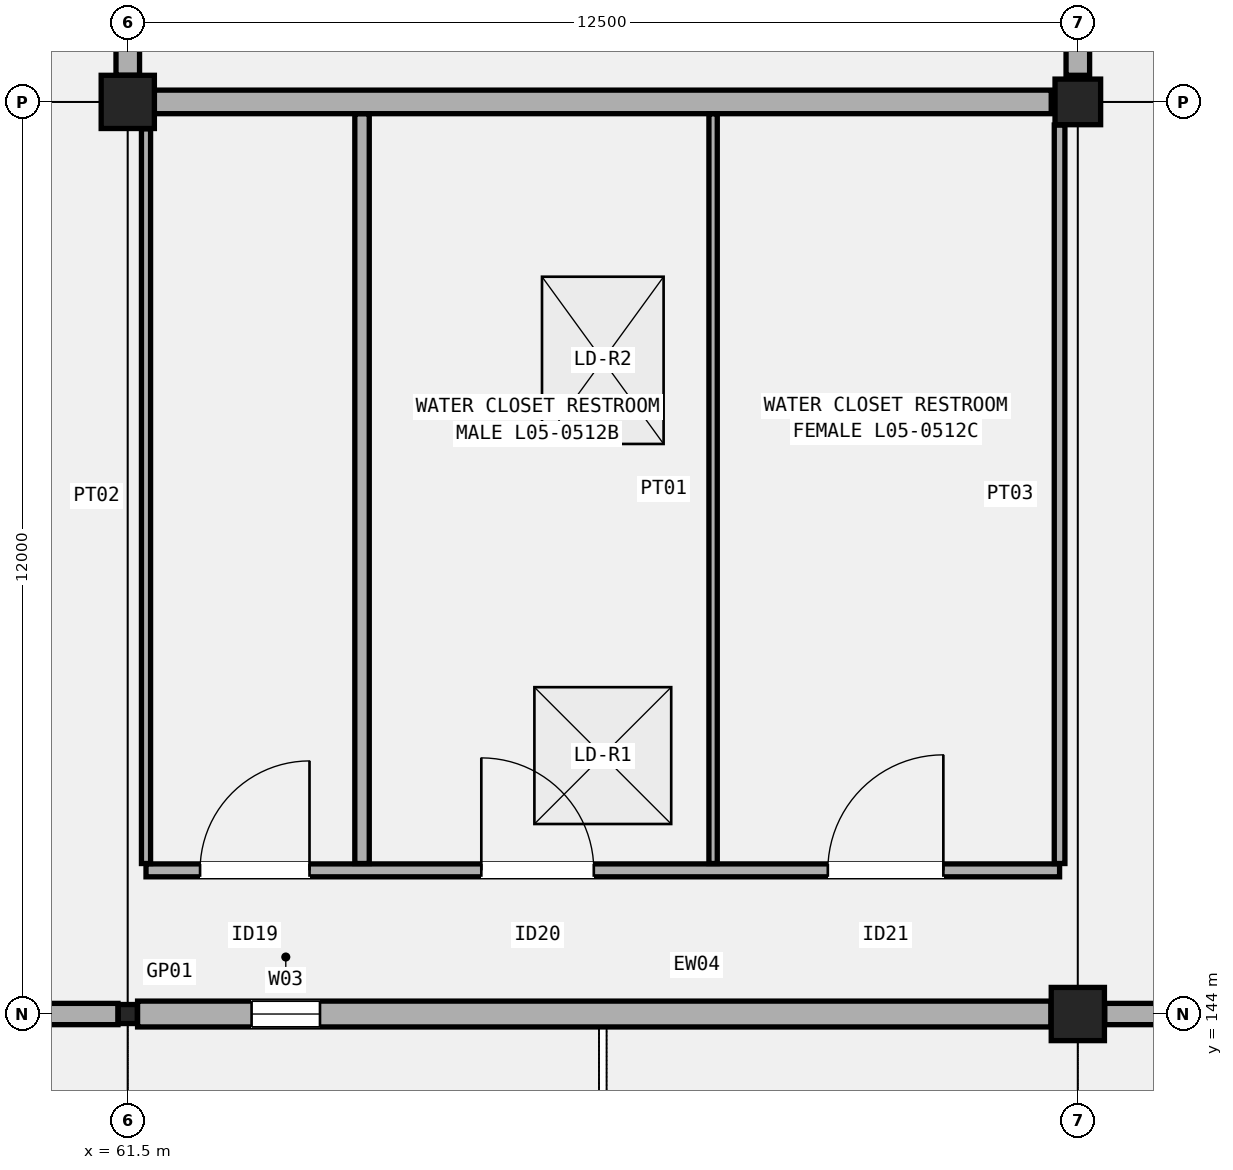
"""IFC4 building model, lengths in metres.
Left out: names, types, materials, properties, quantities, classifications, styles, units other than length and angle.
Written with IfcOpenShell. Run it as: python <this file> out.ifc"""

import sys

from ifc_helpers import new_model, si_unit, direction, frame, frame_2d, origin, origin_2d, place, context, subcontext, project, spatial, rectangle, hollow_rectangle, extrude, element, fill, save


model = new_model("IFC4")
c1 = context("Model", 3, precision=1e-05, world=origin(), true_north=direction((0.0, 1.0)))
c2 = subcontext(c1, "Body", "Model", "MODEL_VIEW")
j1 = project(units=[si_unit("LENGTHUNIT", "METRE"), si_unit("PLANEANGLEUNIT", "RADIAN")], contexts=[c1])
p1 = place(None, origin())
s1 = spatial("IfcSite", under=j1, at=p1, CompositionType="ELEMENT")
p2 = place(p1, origin())
s2 = spatial("IfcBuilding", under=s1, at=p2, CompositionType="ELEMENT")
p3 = place(p2, frame((0.0, 0.0, 25.8)))
s3 = spatial("IfcBuildingStorey", under=s2, at=p3, CompositionType="ELEMENT", Elevation=25.8)
p4 = place(p3, frame((61.5, 144.0, 0.0), z_axis=(0.0, 0.0, 1.0), x_axis=(1.0, 0.0, 0.0)))
e1 = element("IfcColumn", 1, at=p4, inside=s3, PredefinedType="COLUMN", context=c2, shape_type="SweptSolid", body=[
    extrude(hollow_rectangle(XDim=0.25, YDim=0.25, WallThickness=0.012, InnerFilletRadius=0.012, OuterFilletRadius=0.024, at=origin_2d()), origin(), (0.0, 0.0, 1.0), 5.4),
])
for number, where, z_axis, x_axis in (
    (2, (61.5, 156.0, 0.0), (0.0, 0.0, 1.0), (1.0, 0.0, 0.0)),
    (3, (74.0, 144.0, 0.0), (0.0, 0.0, 1.0), (1.0, 0.0, 0.0)),
):
    element("IfcColumn", number, at=place(p3, frame(where, z_axis=z_axis, x_axis=x_axis)), inside=s3, PredefinedType="COLUMN", context=c2, shape_type="SweptSolid", body=[
        extrude(rectangle(XDim=0.7, YDim=0.7, at=origin_2d()), origin(), (0.0, 0.0, 1.0), 5.4),
    ])
p5 = place(p3, frame((74.0, 156.0, 0.0), z_axis=(0.0, 0.0, 1.0), x_axis=(1.0, 0.0, 0.0)))
e4 = element("IfcColumn", 4, at=p5, inside=s3, PredefinedType="COLUMN", context=c2, shape_type="SweptSolid", body=[
    extrude(rectangle(XDim=0.6, YDim=0.6, at=origin_2d()), origin(), (0.0, 0.0, 1.0), 5.4),
])
p6 = place(p3, frame((49.154, 144.0, 0.0), z_axis=(0.0, 0.0, 1.0), x_axis=(1.0, 0.0, 0.0)))
e5 = element("IfcWall", 5, at=p6, inside=s3, PredefinedType="SOLIDWALL", context=c2, shape_type="SweptSolid", body=[
    extrude(rectangle(XDim=12.217, YDim=0.28, at=frame_2d((6.108, 0.0))), origin(), (0.0, 0.0, 1.0), 4.13),
])
p7 = place(p6, frame((1.5, 0.0, 0.95)))
e6 = element("IfcOpeningElement", 6, at=p7, cuts=e5, PredefinedType="OPENING", context=c2, shape_type="SweptSolid", body=[
    extrude(rectangle(XDim=3.6, YDim=1.75, at=frame_2d((1.8, 0.875))), frame((0.0, 0.15, 0.0), z_axis=(0.0, -1.0, 0.0), x_axis=(1.0, 0.0, 0.0)), (0.0, 0.0, 1.0), 0.3),
])
p8 = place(p3, frame((61.629, 144.0, 0.0), z_axis=(0.0, 0.0, 1.0), x_axis=(1.0, 0.0, 0.0)))
e7 = element("IfcWall", 7, at=p8, inside=s3, PredefinedType="SOLIDWALL", context=c2, shape_type="SweptSolid", body=[
    extrude(rectangle(XDim=12.017, YDim=0.34, at=frame_2d((6.009, 0.0))), origin(), (0.0, 0.0, 1.0), 4.13),
])
p9 = place(p8, frame((1.5, 0.0, 0.95)))
e8 = element("IfcOpeningElement", 8, at=p9, cuts=e7, PredefinedType="OPENING", context=c2, shape_type="SweptSolid", body=[
    extrude(rectangle(XDim=0.9, YDim=2.7, at=frame_2d((0.45, 1.35))), frame((0.0, 0.18, 0.0), z_axis=(0.0, -1.0, 0.0), x_axis=(1.0, 0.0, 0.0)), (0.0, 0.0, 1.0), 0.36),
])
p10 = place(p3, frame((74.354, 144.0, 0.0), z_axis=(0.0, 0.0, 1.0), x_axis=(1.0, 0.0, 0.0)))
e9 = element("IfcWall", 9, at=p10, inside=s3, PredefinedType="SOLIDWALL", context=c2, shape_type="SweptSolid", body=[
    extrude(rectangle(XDim=11.842, YDim=0.28, at=frame_2d((5.921, 0.0))), origin(), (0.0, 0.0, 1.0), 4.13),
])
p11 = place(p10, frame((1.5, 0.0, 0.95)))
e10 = element("IfcOpeningElement", 10, at=p11, cuts=e9, PredefinedType="OPENING", context=c2, shape_type="SweptSolid", body=[
    extrude(rectangle(XDim=1.2, YDim=1.9, at=frame_2d((0.6, 0.95))), frame((0.0, 0.15, 0.0), z_axis=(0.0, -1.0, 0.0), x_axis=(1.0, 0.0, 0.0)), (0.0, 0.0, 1.0), 0.3),
])
p12 = place(p3, frame((61.85, 156.0, 5.4), z_axis=(0.0, 0.0, 1.0), x_axis=(1.0, 0.0, 0.0)))
e11 = element("IfcWall", 11, at=p12, inside=s3, PredefinedType="SOLIDWALL", context=c2, shape_type="SweptSolid", body=[
    extrude(rectangle(XDim=11.8, YDim=0.31, at=frame_2d((5.9, 0.0))), origin(), (0.0, 0.0, 1.0), 0.88),
])
for number, where, z_axis, x_axis in (
    (12, (61.5, 156.35, 5.4), (0.0, 0.0, 1.0), (0.0, 1.0, 0.0)),
    (13, (74.0, 156.35, 5.4), (0.0, 0.0, 1.0), (0.0, 1.0, 0.0)),
):
    element("IfcWall", number, at=place(p3, frame(where, z_axis=z_axis, x_axis=x_axis)), inside=s3, PredefinedType="SOLIDWALL", context=c2, shape_type="SweptSolid", body=[
        extrude(rectangle(XDim=11.3, YDim=0.31, at=frame_2d((5.65, 0.0))), origin(), (0.0, 0.0, 1.0), 0.48),
    ])
p13 = place(p3, frame((61.74, 145.89, 0.0), z_axis=(0.0, 0.0, 1.0), x_axis=(1.0, 0.0, 0.0)))
e14 = element("IfcWall", 14, at=p13, inside=s3, PredefinedType="PARTITIONING", context=c2, shape_type="SweptSolid", body=[
    extrude(rectangle(XDim=12.02, YDim=0.17, at=frame_2d((6.01, 0.0))), origin(), (0.0, 0.0, 1.0), 4.35),
])
p14 = place(p13, frame((0.711, 0.0, 0.0)))
e15 = element("IfcOpeningElement", 15, at=p14, cuts=e14, PredefinedType="OPENING", context=c2, shape_type="SweptSolid", body=[
    extrude(rectangle(XDim=1.44, YDim=2.26, at=frame_2d((0.72, 1.13))), frame((0.0, 0.095, 0.0), z_axis=(0.0, -1.0, 0.0), x_axis=(1.0, 0.0, 0.0)), (0.0, 0.0, 1.0), 0.19),
])
p15 = place(p13, frame((4.412, 0.0, 0.0)))
e16 = element("IfcOpeningElement", 16, at=p15, cuts=e14, PredefinedType="OPENING", context=c2, shape_type="SweptSolid", body=[
    extrude(rectangle(XDim=1.48, YDim=2.24, at=frame_2d((0.74, 1.12))), frame((0.0, 0.095, 0.0), z_axis=(0.0, -1.0, 0.0), x_axis=(1.0, 0.0, 0.0)), (0.0, 0.0, 1.0), 0.19),
])
p16 = place(p13, frame((8.971, 0.0, 0.0)))
e17 = element("IfcOpeningElement", 17, at=p16, cuts=e14, PredefinedType="OPENING", context=c2, shape_type="SweptSolid", body=[
    extrude(rectangle(XDim=1.52, YDim=2.28, at=frame_2d((0.76, 1.14))), frame((0.0, 0.095, 0.0), z_axis=(0.0, -1.0, 0.0), x_axis=(1.0, 0.0, 0.0)), (0.0, 0.0, 1.0), 0.19),
])
p17 = place(p3, frame((61.74, 145.98, 0.0), z_axis=(0.0, 0.0, 1.0), x_axis=(0.0, 1.0, 0.0)))
e18 = element("IfcWall", 18, at=p17, inside=s3, PredefinedType="PARTITIONING", context=c2, shape_type="SweptSolid", body=[
    extrude(rectangle(XDim=9.666, YDim=0.12, at=frame_2d((4.833, 0.0))), origin(), (0.0, 0.0, 1.0), 4.35),
])
p18 = place(p3, frame((73.76, 145.98, 0.0), z_axis=(0.0, 0.0, 1.0), x_axis=(0.0, 1.0, 0.0)))
e19 = element("IfcWall", 19, at=p18, inside=s3, PredefinedType="PARTITIONING", context=c2, shape_type="SweptSolid", body=[
    extrude(rectangle(XDim=9.716, YDim=0.14, at=frame_2d((4.858, 0.0))), origin(), (0.0, 0.0, 1.0), 4.3),
])
p19 = place(p3, frame((64.582, 145.98, 0.0), z_axis=(0.0, 0.0, 1.0), x_axis=(0.0, 1.0, 0.0)))
e20 = element("IfcWall", 20, at=p19, inside=s3, PredefinedType="PARTITIONING", context=c2, shape_type="SweptSolid", body=[
    extrude(rectangle(XDim=9.863, YDim=0.19, at=frame_2d((4.932, 0.0))), origin(), (0.0, 0.0, 1.0), 4.35),
])
p20 = place(p3, frame((69.201, 145.98, 0.0), z_axis=(0.0, 0.0, 1.0), x_axis=(0.0, 1.0, 0.0)))
e21 = element("IfcWall", 21, at=p20, inside=s3, PredefinedType="PARTITIONING", context=c2, shape_type="SweptSolid", body=[
    extrude(rectangle(XDim=9.863, YDim=0.11, at=frame_2d((4.932, 0.0))), origin(), (0.0, 0.0, 1.0), 4.35),
])
p21 = place(p9, origin())
e22 = element("IfcWindow", 22, at=p21, inside=s3, PartitioningType="SINGLE_PANEL", PredefinedType="WINDOW", context=c2, shape_type="SweptSolid", body=[
    extrude(rectangle(XDim=0.9, YDim=2.7, at=frame_2d((0.45, 1.35))), frame((0.0, 0.03, 0.0), z_axis=(0.0, -1.0, 0.0), x_axis=(1.0, 0.0, 0.0)), (0.0, 0.0, 1.0), 0.06),
])
fill(e8, e22)
p22 = place(p2, frame((0.0, 0.0, 31.2)))
p23 = place(p22, frame((0.0, 0.0, -0.36)))
p24 = place(p23, frame((67.75, 147.4, 0.0)))
p25 = place(p24, frame((0.0, 0.0, 0.31)))
e23 = element("IfcWindow", 23, at=p25, inside=s3, PartitioningType="SINGLE_PANEL", PredefinedType="LIGHTDOME", context=c2, shape_type="SweptSolid", body=[
    extrude(rectangle(XDim=1.8, YDim=1.8, at=origin_2d()), origin(), (0.0, 0.0, 1.0), 0.05),
])
p26 = place(p23, frame((67.75, 152.6, 0.0)))
p27 = place(p26, frame((0.0, 0.0, 0.31)))
e24 = element("IfcWindow", 24, at=p27, inside=s3, PartitioningType="SINGLE_PANEL", PredefinedType="LIGHTDOME", context=c2, shape_type="SweptSolid", body=[
    extrude(rectangle(XDim=2.2, YDim=1.6, at=origin_2d()), origin(), (0.0, 0.0, 1.0), 0.05),
])
p28 = place(p14, origin())
e25 = element("IfcDoor", 25, at=p28, inside=s3, OperationType="SINGLE_SWING_RIGHT", PredefinedType="DOOR", context=c2, shape_type="SweptSolid", body=[
    extrude(rectangle(XDim=1.44, YDim=2.26, at=frame_2d((0.72, 1.13))), frame((0.0, 0.025, 0.0), z_axis=(0.0, -1.0, 0.0), x_axis=(1.0, 0.0, 0.0)), (0.0, 0.0, 1.0), 0.05),
])
fill(e15, e25)
p29 = place(p15, origin())
e26 = element("IfcDoor", 26, at=p29, inside=s3, OperationType="SINGLE_SWING_LEFT", PredefinedType="DOOR", context=c2, shape_type="SweptSolid", body=[
    extrude(rectangle(XDim=1.48, YDim=2.24, at=frame_2d((0.74, 1.12))), frame((0.0, 0.025, 0.0), z_axis=(0.0, -1.0, 0.0), x_axis=(1.0, 0.0, 0.0)), (0.0, 0.0, 1.0), 0.05),
])
fill(e16, e26)
p30 = place(p16, origin())
e27 = element("IfcDoor", 27, at=p30, inside=s3, OperationType="SINGLE_SWING_RIGHT", PredefinedType="DOOR", context=c2, shape_type="SweptSolid", body=[
    extrude(rectangle(XDim=1.52, YDim=2.28, at=frame_2d((0.76, 1.14))), frame((0.0, 0.025, 0.0), z_axis=(0.0, -1.0, 0.0), x_axis=(1.0, 0.0, 0.0)), (0.0, 0.0, 1.0), 0.05),
])
fill(e17, e27)
save(model, sys.argv[1])
